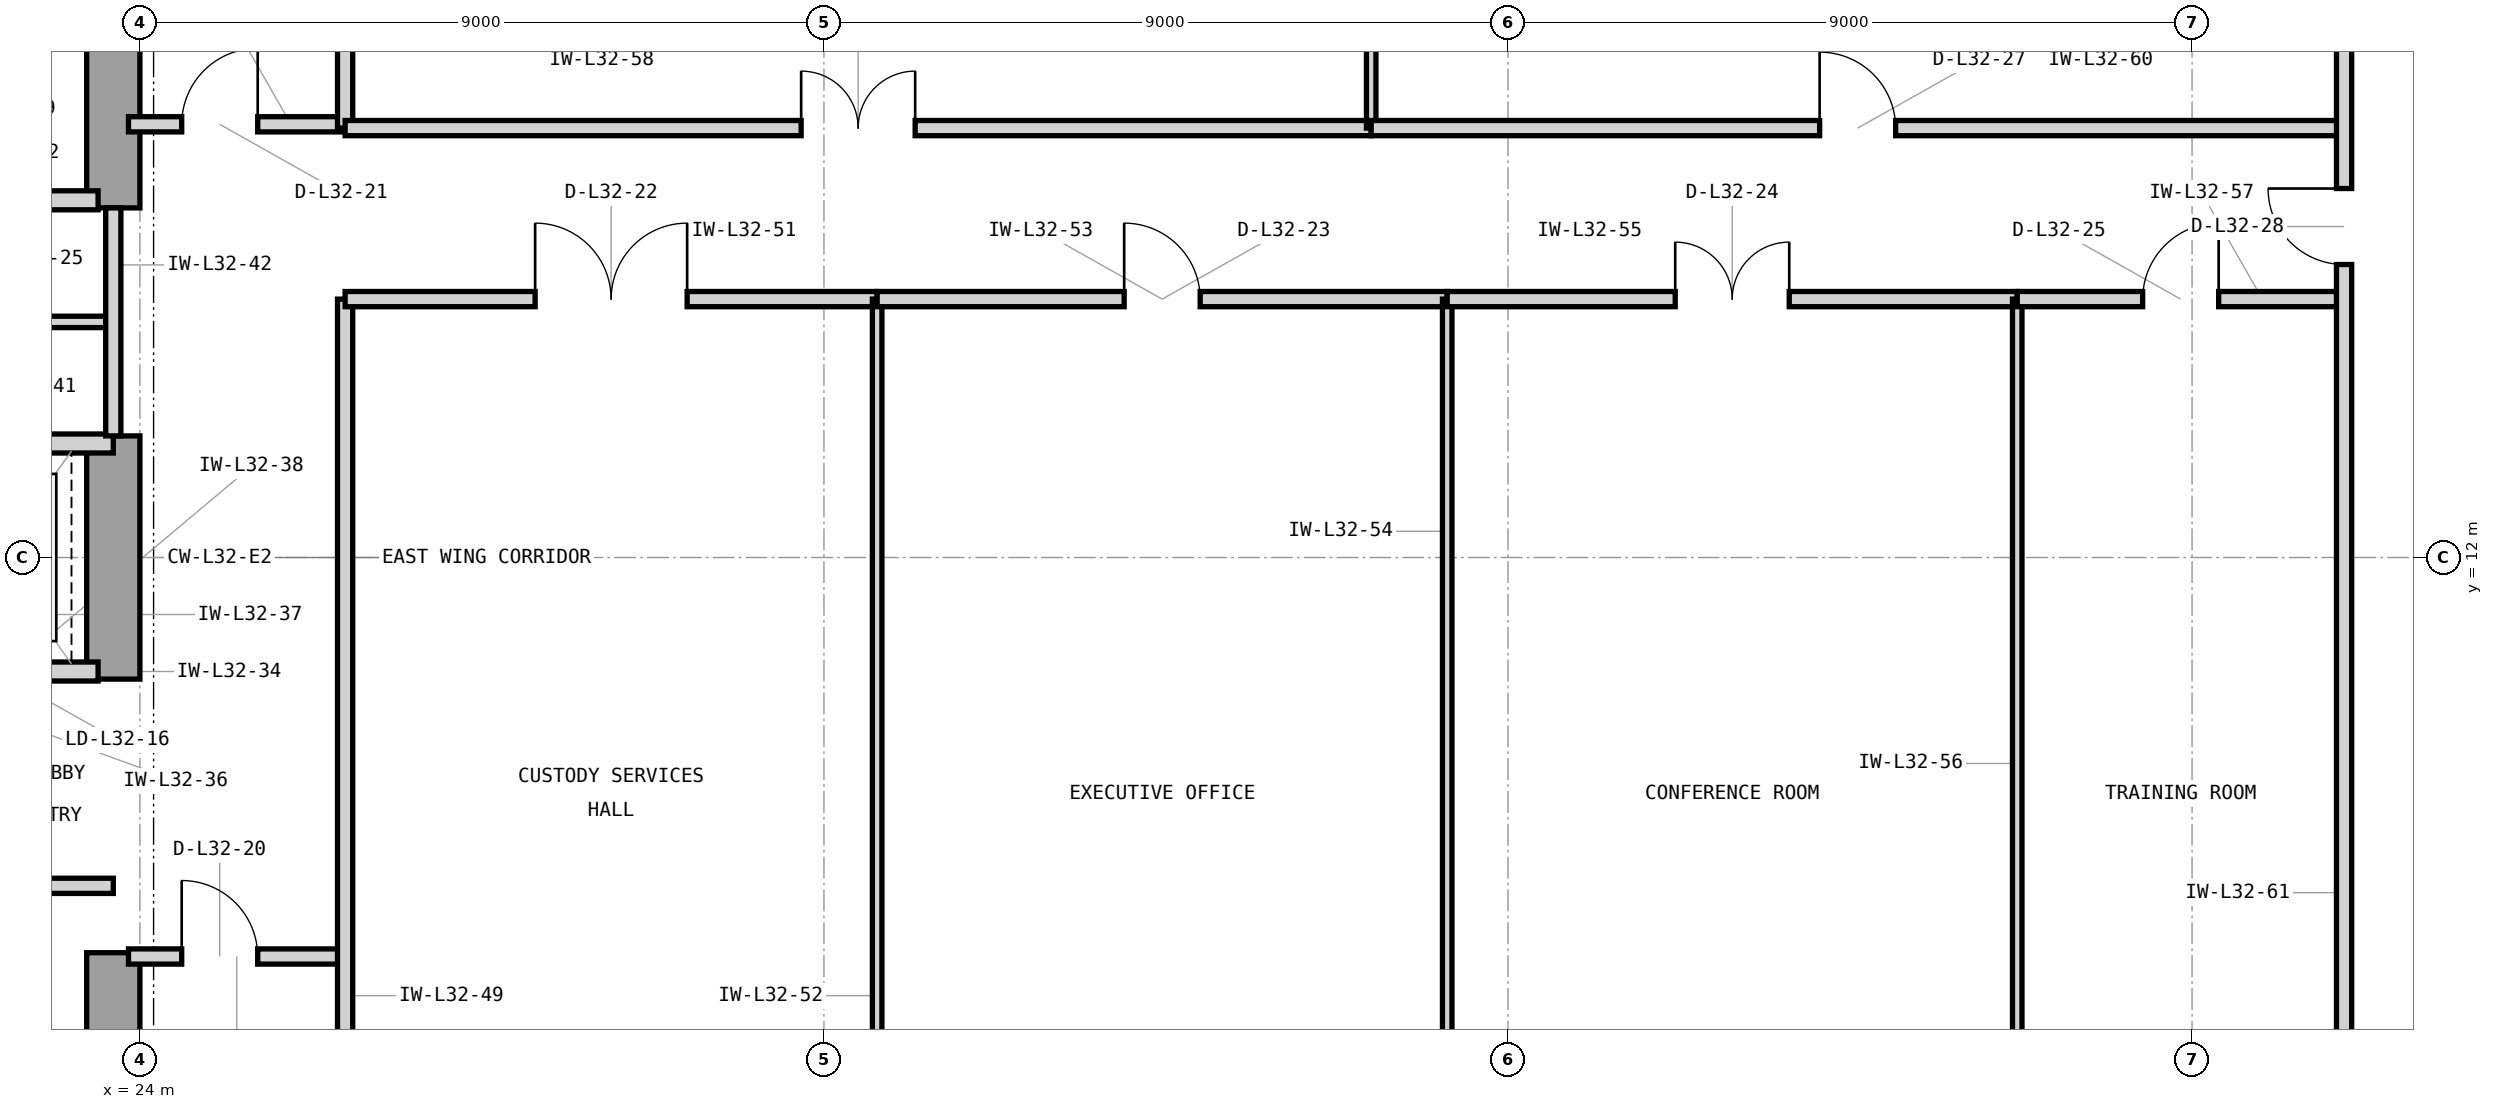
"""IFC4 building model, lengths in metres.
Left out: names, types, materials, properties, quantities, classifications, styles, units other than length and angle.
Written with IfcOpenShell. Run it as: python <this file> out.ifc"""

import sys

from ifc_helpers import new_model, si_unit, direction, frame, frame_2d, origin, place, context, subcontext, project, spatial, rectangle, extrude, element, fill, save


model = new_model("IFC4")
c1 = context("Model", 3, precision=1e-05, world=origin(), true_north=direction((0.0, 1.0)))
c2 = subcontext(c1, "Body", "Model", "MODEL_VIEW")
j1 = project(units=[si_unit("LENGTHUNIT", "METRE"), si_unit("PLANEANGLEUNIT", "RADIAN")], contexts=[c1])
p1 = place(None, origin())
s1 = spatial("IfcSite", under=j1, at=p1, CompositionType="ELEMENT")
p2 = place(p1, origin())
s2 = spatial("IfcBuilding", under=s1, at=p2, CompositionType="ELEMENT")
p3 = place(p2, frame((0.0, 0.0, 136.2)))
s3 = spatial("IfcBuildingStorey", under=s2, at=p3, CompositionType="ELEMENT", Elevation=136.2)
p4 = place(p3, frame((23.65, 3.7, 0.0), z_axis=(0.0, 0.0, 1.0), x_axis=(0.0, 1.0, 0.0)))
e1 = element("IfcWall", 1, at=p4, inside=s3, PredefinedType="SHEAR", context=c2, shape_type="SweptSolid", body=[
    extrude(rectangle(XDim=3.1, YDim=0.7, at=frame_2d((1.55, 0.0))), origin(), (0.0, 0.0, 1.0), 3.9),
])
p5 = place(p3, frame((23.65, 10.4, 0.0), z_axis=(0.0, 0.0, 1.0), x_axis=(0.0, 1.0, 0.0)))
e2 = element("IfcWall", 2, at=p5, inside=s3, PredefinedType="SHEAR", context=c2, shape_type="SweptSolid", body=[
    extrude(rectangle(XDim=3.2, YDim=0.7, at=frame_2d((1.6, 0.0))), origin(), (0.0, 0.0, 1.0), 3.9),
])
p6 = place(p3, frame((23.65, 16.6, 0.0), z_axis=(0.0, 0.0, 1.0), x_axis=(0.0, 1.0, 0.0)))
e3 = element("IfcWall", 3, at=p6, inside=s3, PredefinedType="SHEAR", context=c2, shape_type="SweptSolid", body=[
    extrude(rectangle(XDim=4.05, YDim=0.7, at=frame_2d((2.025, 0.0))), origin(), (0.0, 0.0, 1.0), 3.9),
])
p7 = place(p3, frame((21.05, 16.7, 0.0), z_axis=(0.0, 0.0, 1.0), x_axis=(1.0, 0.0, 0.0)))
e4 = element("IfcWall", 4, at=p7, inside=s3, PredefinedType="PARTITIONING", context=c2, shape_type="SweptSolid", body=[
    extrude(rectangle(XDim=2.4, YDim=0.25, at=frame_2d((1.2, 0.0))), origin(), (0.0, 0.0, 1.0), 3.233),
])
p8 = place(p3, frame((20.55, 7.68, 0.0), z_axis=(0.0, 0.0, 1.0), x_axis=(1.0, 0.0, 0.0)))
e5 = element("IfcWall", 5, at=p8, inside=s3, PredefinedType="PARTITIONING", context=c2, shape_type="SweptSolid", body=[
    extrude(rectangle(XDim=3.1, YDim=0.2, at=frame_2d((1.55, 0.0))), origin(), (0.0, 0.0, 1.0), 3.69),
])
p9 = place(p8, frame((1.075, 0.0, 0.0)))
e6 = element("IfcOpeningElement", 6, at=p9, cuts=e5, PredefinedType="OPENING", context=c2, shape_type="SweptSolid", body=[
    extrude(rectangle(XDim=0.95, YDim=2.1, at=frame_2d((0.475, 1.05))), frame((0.0, 0.11, 0.0), z_axis=(0.0, -1.0, 0.0), x_axis=(1.0, 0.0, 0.0)), (0.0, 0.0, 1.0), 0.22),
])
p10 = place(p3, frame((21.05, 10.5, 0.0), z_axis=(0.0, 0.0, 1.0), x_axis=(1.0, 0.0, 0.0)))
e7 = element("IfcWall", 7, at=p10, inside=s3, PredefinedType="PARTITIONING", context=c2, shape_type="SweptSolid", body=[
    extrude(rectangle(XDim=2.4, YDim=0.25, at=frame_2d((1.2, 0.0))), origin(), (0.0, 0.0, 1.0), 3.233),
])
p11 = place(p10, frame((0.48, 0.0, 0.0)))
e8 = element("IfcOpeningElement", 8, at=p11, cuts=e7, PredefinedType="OPENING", context=c2, shape_type="SweptSolid", body=[
    extrude(rectangle(XDim=1.15, YDim=2.25, at=frame_2d((0.575, 1.125))), frame((0.0, 0.135, 0.0), z_axis=(0.0, -1.0, 0.0), x_axis=(1.0, 0.0, 0.0)), (0.0, 0.0, 1.0), 0.27),
])
p12 = place(p3, frame((14.7, 13.5, 0.0), z_axis=(0.0, 0.0, 1.0), x_axis=(1.0, 0.0, 0.0)))
e9 = element("IfcWall", 9, at=p12, inside=s3, PredefinedType="PARTITIONING", context=c2, shape_type="SweptSolid", body=[
    extrude(rectangle(XDim=8.95, YDim=0.25, at=frame_2d((4.475, 0.0))), origin(), (0.0, 0.0, 1.0), 3.233),
])
p13 = place(p3, frame((16.6, 15.1, 0.0), z_axis=(0.0, 0.0, 1.0), x_axis=(1.0, 0.0, 0.0)))
e10 = element("IfcWall", 10, at=p13, inside=s3, PredefinedType="PARTITIONING", context=c2, shape_type="SweptSolid", body=[
    extrude(rectangle(XDim=7.05, YDim=0.15, at=frame_2d((3.525, 0.0))), origin(), (0.0, 0.0, 1.0), 3.69),
])
p14 = place(p3, frame((23.65, 13.6, 0.0), z_axis=(0.0, 0.0, 1.0), x_axis=(0.0, 1.0, 0.0)))
e11 = element("IfcWall", 11, at=p14, inside=s3, PredefinedType="PARTITIONING", context=c2, shape_type="SweptSolid", body=[
    extrude(rectangle(XDim=3.0, YDim=0.2, at=frame_2d((1.5, 0.0))), origin(), (0.0, 0.0, 1.0), 3.69),
])
p15 = place(p3, frame((23.85, 6.75, 0.0), z_axis=(0.0, 0.0, 1.0), x_axis=(1.0, 0.0, 0.0)))
e12 = element("IfcWall", 12, at=p15, inside=s3, PredefinedType="PARTITIONING", context=c2, shape_type="SweptSolid", body=[
    extrude(rectangle(XDim=2.85, YDim=0.2, at=frame_2d((1.425, 0.0))), origin(), (0.0, 0.0, 1.0), 3.69),
])
p16 = place(p15, frame((0.7, 0.0, 0.0)))
e13 = element("IfcOpeningElement", 13, at=p16, cuts=e12, PredefinedType="OPENING", context=c2, shape_type="SweptSolid", body=[
    extrude(rectangle(XDim=1.0, YDim=2.15, at=frame_2d((0.5, 1.075))), frame((0.0, 0.11, 0.0), z_axis=(0.0, -1.0, 0.0), x_axis=(1.0, 0.0, 0.0)), (0.0, 0.0, 1.0), 0.22),
])
p17 = place(p3, frame((23.85, 17.7, 0.0), z_axis=(0.0, 0.0, 1.0), x_axis=(1.0, 0.0, 0.0)))
e14 = element("IfcWall", 14, at=p17, inside=s3, PredefinedType="PARTITIONING", context=c2, shape_type="SweptSolid", body=[
    extrude(rectangle(XDim=2.85, YDim=0.2, at=frame_2d((1.425, 0.0))), origin(), (0.0, 0.0, 1.0), 3.69),
])
p18 = place(p17, frame((0.7, 0.0, 0.0)))
e15 = element("IfcOpeningElement", 15, at=p18, cuts=e14, PredefinedType="OPENING", context=c2, shape_type="SweptSolid", body=[
    extrude(rectangle(XDim=1.0, YDim=2.15, at=frame_2d((0.5, 1.075))), frame((0.0, 0.11, 0.0), z_axis=(0.0, -1.0, 0.0), x_axis=(1.0, 0.0, 0.0)), (0.0, 0.0, 1.0), 0.22),
])
p19 = place(p3, frame((26.7, 3.18, 0.0), z_axis=(0.0, 0.0, 1.0), x_axis=(0.0, 1.0, 0.0)))
e16 = element("IfcWall", 16, at=p19, inside=s3, PredefinedType="PARTITIONING", context=c2, shape_type="SweptSolid", body=[
    extrude(rectangle(XDim=12.22, YDim=0.2, at=frame_2d((6.11, 0.0))), origin(), (0.0, 0.0, 1.0), 3.69),
])
p20 = place(p3, frame((26.7, 17.65, 0.0), z_axis=(0.0, 0.0, 1.0), x_axis=(0.0, 1.0, 0.0)))
e17 = element("IfcWall", 17, at=p20, inside=s3, PredefinedType="PARTITIONING", context=c2, shape_type="SweptSolid", body=[
    extrude(rectangle(XDim=3.17, YDim=0.2, at=frame_2d((1.585, 0.0))), origin(), (0.0, 0.0, 1.0), 3.69),
])
p21 = place(p3, frame((26.7, 15.4, 0.0), z_axis=(0.0, 0.0, 1.0), x_axis=(1.0, 0.0, 0.0)))
e18 = element("IfcWall", 18, at=p21, inside=s3, PredefinedType="PARTITIONING", context=c2, shape_type="SweptSolid", body=[
    extrude(rectangle(XDim=7.0, YDim=0.2, at=frame_2d((3.5, 0.0))), origin(), (0.0, 0.0, 1.0), 3.69),
])
p22 = place(p21, frame((2.5, 0.0, 0.0)))
e19 = element("IfcOpeningElement", 19, at=p22, cuts=e18, PredefinedType="OPENING", context=c2, shape_type="SweptSolid", body=[
    extrude(rectangle(XDim=2.0, YDim=2.5, at=frame_2d((1.0, 1.25))), frame((0.0, 0.11, 0.0), z_axis=(0.0, -1.0, 0.0), x_axis=(1.0, 0.0, 0.0)), (0.0, 0.0, 1.0), 0.22),
])
p23 = place(p3, frame((33.7, 3.18, 0.0), z_axis=(0.0, 0.0, 1.0), x_axis=(0.0, 1.0, 0.0)))
e20 = element("IfcWall", 20, at=p23, inside=s3, PredefinedType="PARTITIONING", context=c2, shape_type="SweptSolid", body=[
    extrude(rectangle(XDim=12.22, YDim=0.125, at=frame_2d((6.11, 0.0))), origin(), (0.0, 0.0, 1.0), 3.69),
])
p24 = place(p3, frame((33.7, 15.4, 0.0), z_axis=(0.0, 0.0, 1.0), x_axis=(1.0, 0.0, 0.0)))
e21 = element("IfcWall", 21, at=p24, inside=s3, PredefinedType="PARTITIONING", context=c2, shape_type="SweptSolid", body=[
    extrude(rectangle(XDim=7.5, YDim=0.2, at=frame_2d((3.75, 0.0))), origin(), (0.0, 0.0, 1.0), 3.69),
])
p25 = place(p24, frame((3.25, 0.0, 0.0)))
e22 = element("IfcOpeningElement", 22, at=p25, cuts=e21, PredefinedType="OPENING", context=c2, shape_type="SweptSolid", body=[
    extrude(rectangle(XDim=1.0, YDim=2.15, at=frame_2d((0.5, 1.075))), frame((0.0, 0.11, 0.0), z_axis=(0.0, -1.0, 0.0), x_axis=(1.0, 0.0, 0.0)), (0.0, 0.0, 1.0), 0.22),
])
p26 = place(p3, frame((41.2, 3.18, 0.0), z_axis=(0.0, 0.0, 1.0), x_axis=(0.0, 1.0, 0.0)))
e23 = element("IfcWall", 23, at=p26, inside=s3, PredefinedType="PARTITIONING", context=c2, shape_type="SweptSolid", body=[
    extrude(rectangle(XDim=12.22, YDim=0.125, at=frame_2d((6.11, 0.0))), origin(), (0.0, 0.0, 1.0), 3.69),
])
p27 = place(p3, frame((41.2, 15.4, 0.0), z_axis=(0.0, 0.0, 1.0), x_axis=(1.0, 0.0, 0.0)))
e24 = element("IfcWall", 24, at=p27, inside=s3, PredefinedType="PARTITIONING", context=c2, shape_type="SweptSolid", body=[
    extrude(rectangle(XDim=7.5, YDim=0.2, at=frame_2d((3.75, 0.0))), origin(), (0.0, 0.0, 1.0), 3.69),
])
p28 = place(p27, frame((3.0, 0.0, 0.0)))
e25 = element("IfcOpeningElement", 25, at=p28, cuts=e24, PredefinedType="OPENING", context=c2, shape_type="SweptSolid", body=[
    extrude(rectangle(XDim=1.5, YDim=2.3, at=frame_2d((0.75, 1.15))), frame((0.0, 0.11, 0.0), z_axis=(0.0, -1.0, 0.0), x_axis=(1.0, 0.0, 0.0)), (0.0, 0.0, 1.0), 0.22),
])
p29 = place(p3, frame((48.7, 3.18, 0.0), z_axis=(0.0, 0.0, 1.0), x_axis=(0.0, 1.0, 0.0)))
e26 = element("IfcWall", 26, at=p29, inside=s3, PredefinedType="PARTITIONING", context=c2, shape_type="SweptSolid", body=[
    extrude(rectangle(XDim=12.22, YDim=0.125, at=frame_2d((6.11, 0.0))), origin(), (0.0, 0.0, 1.0), 3.69),
])
p30 = place(p3, frame((48.7, 15.4, 0.0), z_axis=(0.0, 0.0, 1.0), x_axis=(1.0, 0.0, 0.0)))
e27 = element("IfcWall", 27, at=p30, inside=s3, PredefinedType="PARTITIONING", context=c2, shape_type="SweptSolid", body=[
    extrude(rectangle(XDim=4.3, YDim=0.2, at=frame_2d((2.15, 0.0))), origin(), (0.0, 0.0, 1.0), 3.69),
])
p31 = place(p30, frame((1.65, 0.0, 0.0)))
e28 = element("IfcOpeningElement", 28, at=p31, cuts=e27, PredefinedType="OPENING", context=c2, shape_type="SweptSolid", body=[
    extrude(rectangle(XDim=1.0, YDim=2.15, at=frame_2d((0.5, 1.075))), frame((0.0, 0.11, 0.0), z_axis=(0.0, -1.0, 0.0), x_axis=(1.0, 0.0, 0.0)), (0.0, 0.0, 1.0), 0.22),
])
p32 = place(p3, frame((26.7, 17.65, 0.0), z_axis=(0.0, 0.0, 1.0), x_axis=(1.0, 0.0, 0.0)))
e29 = element("IfcWall", 29, at=p32, inside=s3, PredefinedType="PARTITIONING", context=c2, shape_type="SweptSolid", body=[
    extrude(rectangle(XDim=13.5, YDim=0.2, at=frame_2d((6.75, 0.0))), origin(), (0.0, 0.0, 1.0), 3.69),
])
p33 = place(p32, frame((6.0, 0.0, 0.0)))
e30 = element("IfcOpeningElement", 30, at=p33, cuts=e29, PredefinedType="OPENING", context=c2, shape_type="SweptSolid", body=[
    extrude(rectangle(XDim=1.5, YDim=2.3, at=frame_2d((0.75, 1.15))), frame((0.0, 0.11, 0.0), z_axis=(0.0, -1.0, 0.0), x_axis=(1.0, 0.0, 0.0)), (0.0, 0.0, 1.0), 0.22),
])
p34 = place(p3, frame((40.2, 17.65, 0.0), z_axis=(0.0, 0.0, 1.0), x_axis=(0.0, 1.0, 0.0)))
e31 = element("IfcWall", 31, at=p34, inside=s3, PredefinedType="PARTITIONING", context=c2, shape_type="SweptSolid", body=[
    extrude(rectangle(XDim=3.17, YDim=0.125, at=frame_2d((1.585, 0.0))), origin(), (0.0, 0.0, 1.0), 3.69),
])
p35 = place(p3, frame((40.2, 17.65, 0.0), z_axis=(0.0, 0.0, 1.0), x_axis=(1.0, 0.0, 0.0)))
e32 = element("IfcWall", 32, at=p35, inside=s3, PredefinedType="PARTITIONING", context=c2, shape_type="SweptSolid", body=[
    extrude(rectangle(XDim=12.8, YDim=0.2, at=frame_2d((6.4, 0.0))), origin(), (0.0, 0.0, 1.0), 3.69),
])
p36 = place(p35, frame((5.9, 0.0, 0.0)))
e33 = element("IfcOpeningElement", 33, at=p36, cuts=e32, PredefinedType="OPENING", context=c2, shape_type="SweptSolid", body=[
    extrude(rectangle(XDim=1.0, YDim=2.15, at=frame_2d((0.5, 1.075))), frame((0.0, 0.11, 0.0), z_axis=(0.0, -1.0, 0.0), x_axis=(1.0, 0.0, 0.0)), (0.0, 0.0, 1.0), 0.22),
])
p37 = place(p3, frame((53.0, 3.18, 0.0), z_axis=(0.0, 0.0, 1.0), x_axis=(0.0, 1.0, 0.0)))
e34 = element("IfcWall", 34, at=p37, inside=s3, PredefinedType="PARTITIONING", context=c2, shape_type="SweptSolid", body=[
    extrude(rectangle(XDim=17.64, YDim=0.2, at=frame_2d((8.82, 0.0))), origin(), (0.0, 0.0, 1.0), 3.69),
])
p38 = place(p37, frame((12.675, 0.0, 0.0)))
e35 = element("IfcOpeningElement", 35, at=p38, cuts=e34, PredefinedType="OPENING", context=c2, shape_type="SweptSolid", body=[
    extrude(rectangle(XDim=1.0, YDim=2.15, at=frame_2d((0.5, 1.075))), frame((0.0, 0.11, 0.0), z_axis=(0.0, -1.0, 0.0), x_axis=(1.0, 0.0, 0.0)), (0.0, 0.0, 1.0), 0.22),
])
p39 = place(p16, origin())
e36 = element("IfcDoor", 36, at=p39, inside=s3, OperationType="SINGLE_SWING_LEFT", PredefinedType="DOOR", context=c2, shape_type="SweptSolid", body=[
    extrude(rectangle(XDim=1.0, YDim=2.15, at=frame_2d((0.5, 1.075))), frame((0.0, 0.025, 0.0), z_axis=(0.0, -1.0, 0.0), x_axis=(1.0, 0.0, 0.0)), (0.0, 0.0, 1.0), 0.05),
])
fill(e13, e36)
p40 = place(p18, origin())
e37 = element("IfcDoor", 37, at=p40, inside=s3, OperationType="SINGLE_SWING_RIGHT", PredefinedType="DOOR", context=c2, shape_type="SweptSolid", body=[
    extrude(rectangle(XDim=1.0, YDim=2.15, at=frame_2d((0.5, 1.075))), frame((0.0, 0.025, 0.0), z_axis=(0.0, -1.0, 0.0), x_axis=(1.0, 0.0, 0.0)), (0.0, 0.0, 1.0), 0.05),
])
fill(e15, e37)
p41 = place(p22, origin())
e38 = element("IfcDoor", 38, at=p41, inside=s3, OperationType="DOUBLE_DOOR_SINGLE_SWING", PredefinedType="DOOR", context=c2, shape_type="SweptSolid", body=[
    extrude(rectangle(XDim=2.0, YDim=2.5, at=frame_2d((1.0, 1.25))), frame((0.0, 0.025, 0.0), z_axis=(0.0, -1.0, 0.0), x_axis=(1.0, 0.0, 0.0)), (0.0, 0.0, 1.0), 0.05),
])
fill(e19, e38)
p42 = place(p25, origin())
e39 = element("IfcDoor", 39, at=p42, inside=s3, OperationType="SINGLE_SWING_LEFT", PredefinedType="DOOR", context=c2, shape_type="SweptSolid", body=[
    extrude(rectangle(XDim=1.0, YDim=2.15, at=frame_2d((0.5, 1.075))), frame((0.0, 0.025, 0.0), z_axis=(0.0, -1.0, 0.0), x_axis=(1.0, 0.0, 0.0)), (0.0, 0.0, 1.0), 0.05),
])
fill(e22, e39)
p43 = place(p28, origin())
e40 = element("IfcDoor", 40, at=p43, inside=s3, OperationType="DOUBLE_DOOR_SINGLE_SWING", PredefinedType="DOOR", context=c2, shape_type="SweptSolid", body=[
    extrude(rectangle(XDim=1.5, YDim=2.3, at=frame_2d((0.75, 1.15))), frame((0.0, 0.025, 0.0), z_axis=(0.0, -1.0, 0.0), x_axis=(1.0, 0.0, 0.0)), (0.0, 0.0, 1.0), 0.05),
])
fill(e25, e40)
p44 = place(p31, origin())
e41 = element("IfcDoor", 41, at=p44, inside=s3, OperationType="SINGLE_SWING_RIGHT", PredefinedType="DOOR", context=c2, shape_type="SweptSolid", body=[
    extrude(rectangle(XDim=1.0, YDim=2.15, at=frame_2d((0.5, 1.075))), frame((0.0, 0.025, 0.0), z_axis=(0.0, -1.0, 0.0), x_axis=(1.0, 0.0, 0.0)), (0.0, 0.0, 1.0), 0.05),
])
fill(e28, e41)
p45 = place(p33, origin())
e42 = element("IfcDoor", 42, at=p45, inside=s3, OperationType="DOUBLE_DOOR_SINGLE_SWING", PredefinedType="DOOR", context=c2, shape_type="SweptSolid", body=[
    extrude(rectangle(XDim=1.5, YDim=2.3, at=frame_2d((0.75, 1.15))), frame((0.0, 0.025, 0.0), z_axis=(0.0, -1.0, 0.0), x_axis=(1.0, 0.0, 0.0)), (0.0, 0.0, 1.0), 0.05),
])
fill(e30, e42)
p46 = place(p36, origin())
e43 = element("IfcDoor", 43, at=p46, inside=s3, OperationType="SINGLE_SWING_LEFT", PredefinedType="DOOR", context=c2, shape_type="SweptSolid", body=[
    extrude(rectangle(XDim=1.0, YDim=2.15, at=frame_2d((0.5, 1.075))), frame((0.0, 0.025, 0.0), z_axis=(0.0, -1.0, 0.0), x_axis=(1.0, 0.0, 0.0)), (0.0, 0.0, 1.0), 0.05),
])
fill(e33, e43)
p47 = place(p38, origin())
e44 = element("IfcDoor", 44, at=p47, inside=s3, OperationType="SINGLE_SWING_RIGHT", PredefinedType="DOOR", context=c2, shape_type="SweptSolid", body=[
    extrude(rectangle(XDim=1.0, YDim=2.15, at=frame_2d((0.5, 1.075))), frame((0.0, 0.025, 0.0), z_axis=(0.0, -1.0, 0.0), x_axis=(1.0, 0.0, 0.0)), (0.0, 0.0, 1.0), 0.05),
])
fill(e35, e44)
save(model, sys.argv[1])
